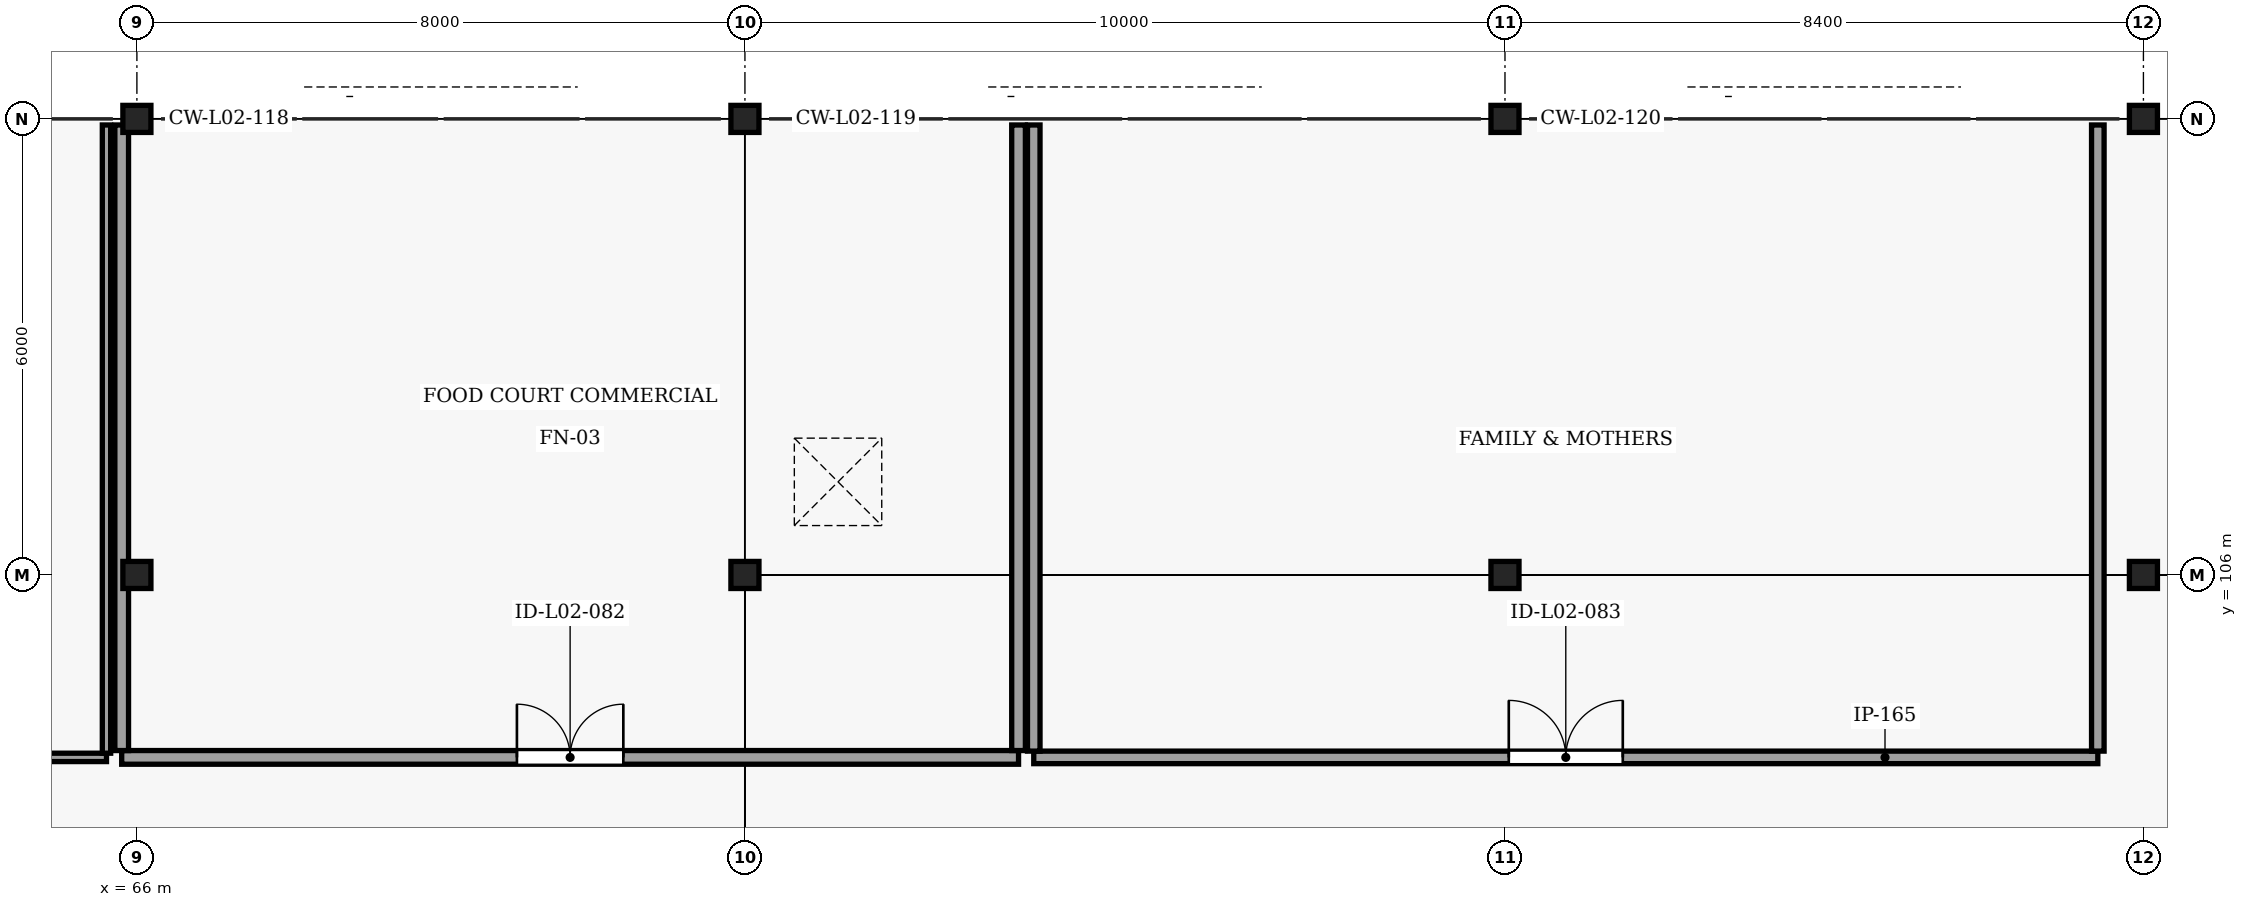
"""IFC4 building model, lengths in metres.
Left out: names, types, materials, properties, quantities, classifications, styles, units other than length and angle.
Written with IfcOpenShell. Run it as: python <this file> out.ifc"""

import sys

from ifc_helpers import new_model, si_unit, direction, frame, frame_2d, origin, origin_2d, place, context, subcontext, project, spatial, rectangle, i_section, extrude, element, fill, save


model = new_model("IFC4")
c1 = context("Model", 3, precision=1e-05, world=origin(), true_north=direction((0.0, 1.0)))
c2 = subcontext(c1, "Body", "Model", "MODEL_VIEW")
j1 = project(units=[si_unit("LENGTHUNIT", "METRE"), si_unit("PLANEANGLEUNIT", "RADIAN")], contexts=[c1])
p1 = place(None, origin())
s1 = spatial("IfcSite", under=j1, at=p1, CompositionType="ELEMENT")
p2 = place(p1, origin())
s2 = spatial("IfcBuilding", under=s1, at=p2, CompositionType="ELEMENT")
p3 = place(p2, frame((0.0, 0.0, 5.4)))
s3 = spatial("IfcBuildingStorey", under=s2, at=p3, CompositionType="ELEMENT", Elevation=5.4)
p4 = place(p3, frame((66.0, 106.0, 0.0), z_axis=(0.0, 0.0, 1.0), x_axis=(1.0, 0.0, 0.0)))
e1 = element("IfcColumn", 1, at=p4, inside=s3, PredefinedType="COLUMN", context=c2, shape_type="SweptSolid", body=[
    extrude(i_section(OverallWidth=0.369, OverallDepth=0.356, WebThickness=0.011, FlangeThickness=0.018, FilletRadius=0.015, at=origin_2d()), origin(), (0.0, 0.0, 1.0), 4.45),
])
for number, where, z_axis, x_axis in (
    (2, (74.0, 106.0, 0.0), (0.0, 0.0, 1.0), (1.0, 0.0, 0.0)),
    (3, (84.0, 106.0, 0.0), (0.0, 0.0, 1.0), (1.0, 0.0, 0.0)),
    (4, (92.4, 106.0, 0.0), (0.0, 0.0, 1.0), (1.0, 0.0, 0.0)),
):
    element("IfcColumn", number, at=place(p3, frame(where, z_axis=z_axis, x_axis=x_axis)), inside=s3, PredefinedType="COLUMN", context=c2, shape_type="SweptSolid", body=[
        extrude(i_section(OverallWidth=0.369, OverallDepth=0.356, WebThickness=0.011, FlangeThickness=0.018, FilletRadius=0.015, at=origin_2d()), origin(), (0.0, 0.0, 1.0), 4.5),
    ])
p5 = place(p3, frame((66.0, 112.0, 0.0), z_axis=(0.0, 0.0, 1.0), x_axis=(1.0, 0.0, 0.0)))
e5 = element("IfcColumn", 5, at=p5, inside=s3, PredefinedType="COLUMN", context=c2, shape_type="SweptSolid", body=[
    extrude(i_section(OverallWidth=0.369, OverallDepth=0.356, WebThickness=0.011, FlangeThickness=0.018, FilletRadius=0.015, at=origin_2d()), origin(), (0.0, 0.0, 1.0), 4.45),
])
for number, where, z_axis, x_axis in (
    (6, (74.0, 112.0, 0.0), (0.0, 0.0, 1.0), (1.0, 0.0, 0.0)),
    (7, (84.0, 112.0, 0.0), (0.0, 0.0, 1.0), (1.0, 0.0, 0.0)),
    (8, (92.4, 112.0, 0.0), (0.0, 0.0, 1.0), (1.0, 0.0, 0.0)),
):
    element("IfcColumn", number, at=place(p3, frame(where, z_axis=z_axis, x_axis=x_axis)), inside=s3, PredefinedType="COLUMN", context=c2, shape_type="SweptSolid", body=[
        extrude(i_section(OverallWidth=0.369, OverallDepth=0.356, WebThickness=0.011, FlangeThickness=0.018, FilletRadius=0.015, at=origin_2d()), origin(), (0.0, 0.0, 1.0), 4.5),
    ])
p6 = place(p3, frame((55.6, 103.6, 0.0), z_axis=(0.0, 0.0, 1.0), x_axis=(1.0, 0.0, 0.0)))
e9 = element("IfcWall", 9, at=p6, inside=s3, PredefinedType="MOVABLE", context=c2, shape_type="SweptSolid", body=[
    extrude(rectangle(XDim=10.0, YDim=0.11, at=frame_2d((5.0, 0.0))), origin(), (0.0, 0.0, 1.0), 4.033),
])
p7 = place(p6, frame((4.1, 0.0, 0.0)))
e10 = element("IfcOpeningElement", 10, at=p7, cuts=e9, PredefinedType="OPENING", context=c2, shape_type="SweptSolid", body=[
    extrude(rectangle(XDim=1.8, YDim=2.3, at=frame_2d((0.9, 1.15))), frame((0.0, 0.065, 0.0), z_axis=(0.0, -1.0, 0.0), x_axis=(1.0, 0.0, 0.0)), (0.0, 0.0, 1.0), 0.13),
])
p8 = place(p3, frame((65.6, 103.655, 0.0), z_axis=(0.0, 0.0, 1.0), x_axis=(0.0, 1.0, 0.0)))
e11 = element("IfcWall", 11, at=p8, inside=s3, PredefinedType="MOVABLE", context=c2, shape_type="SweptSolid", body=[
    extrude(rectangle(XDim=8.265, YDim=0.11, at=frame_2d((4.132, 0.0))), origin(), (0.0, 0.0, 1.0), 3.99),
])
p9 = place(p3, frame((65.8, 103.6, 0.0), z_axis=(0.0, 0.0, 1.0), x_axis=(1.0, 0.0, 0.0)))
e12 = element("IfcWall", 12, at=p9, inside=s3, PredefinedType="SOLIDWALL", context=c2, shape_type="SweptSolid", body=[
    extrude(rectangle(XDim=11.8, YDim=0.18, at=frame_2d((5.9, 0.0))), origin(), (0.0, 0.0, 1.0), 4.033),
])
p10 = place(p9, frame((5.2, 0.0, 0.0)))
e13 = element("IfcOpeningElement", 13, at=p10, cuts=e12, PredefinedType="OPENING", context=c2, shape_type="SweptSolid", body=[
    extrude(rectangle(XDim=1.4, YDim=2.2, at=frame_2d((0.7, 1.1))), frame((0.0, 0.1, 0.0), z_axis=(0.0, -1.0, 0.0), x_axis=(1.0, 0.0, 0.0)), (0.0, 0.0, 1.0), 0.2),
])
p11 = place(p3, frame((65.8, 103.69, 0.0), z_axis=(0.0, 0.0, 1.0), x_axis=(0.0, 1.0, 0.0)))
e14 = element("IfcWall", 14, at=p11, inside=s3, PredefinedType="SOLIDWALL", context=c2, shape_type="SweptSolid", body=[
    extrude(rectangle(XDim=8.23, YDim=0.18, at=frame_2d((4.115, 0.0))), origin(), (0.0, 0.0, 1.0), 3.99),
])
p12 = place(p3, frame((77.6, 103.69, 0.0), z_axis=(0.0, 0.0, 1.0), x_axis=(0.0, 1.0, 0.0)))
e15 = element("IfcWall", 15, at=p12, inside=s3, PredefinedType="SOLIDWALL", context=c2, shape_type="SweptSolid", body=[
    extrude(rectangle(XDim=8.23, YDim=0.18, at=frame_2d((4.115, 0.0))), origin(), (0.0, 0.0, 1.0), 4.04),
])
p13 = place(p3, frame((77.8, 103.6, 0.0), z_axis=(0.0, 0.0, 1.0), x_axis=(1.0, 0.0, 0.0)))
e16 = element("IfcWall", 16, at=p13, inside=s3, PredefinedType="PARTITIONING", context=c2, shape_type="SweptSolid", body=[
    extrude(rectangle(XDim=14.0, YDim=0.165, at=frame_2d((7.0, 0.0))), origin(), (0.0, 0.0, 1.0), 4.083),
])
p14 = place(p13, frame((6.25, 0.0, 0.0)))
e17 = element("IfcOpeningElement", 17, at=p14, cuts=e16, PredefinedType="OPENING", context=c2, shape_type="SweptSolid", body=[
    extrude(rectangle(XDim=1.5, YDim=2.3, at=frame_2d((0.75, 1.15))), frame((0.0, 0.093, 0.0), z_axis=(0.0, -1.0, 0.0), x_axis=(1.0, 0.0, 0.0)), (0.0, 0.0, 1.0), 0.185),
])
for number, where, z_axis, x_axis in (
    (18, (77.8, 103.683, 0.0), (0.0, 0.0, 1.0), (0.0, 1.0, 0.0)),
    (19, (91.8, 103.683, 0.0), (0.0, 0.0, 1.0), (0.0, 1.0, 0.0)),
):
    element("IfcWall", number, at=place(p3, frame(where, z_axis=z_axis, x_axis=x_axis)), inside=s3, PredefinedType="PARTITIONING", context=c2, shape_type="SweptSolid", body=[
        extrude(rectangle(XDim=8.237, YDim=0.165, at=frame_2d((4.119, 0.0))), origin(), (0.0, 0.0, 1.0), 4.04),
    ])
p15 = place(p10, origin())
e20 = element("IfcDoor", 20, at=p15, inside=s3, OperationType="DOUBLE_DOOR_DOUBLE_SWING", PredefinedType="DOOR", context=c2, shape_type="SweptSolid", body=[
    extrude(rectangle(XDim=1.4, YDim=2.2, at=frame_2d((0.7, 1.1))), frame((0.0, 0.025, 0.0), z_axis=(0.0, -1.0, 0.0), x_axis=(1.0, 0.0, 0.0)), (0.0, 0.0, 1.0), 0.05),
])
fill(e13, e20)
p16 = place(p14, origin())
e21 = element("IfcDoor", 21, at=p16, inside=s3, OperationType="DOUBLE_DOOR_SINGLE_SWING", PredefinedType="DOOR", context=c2, shape_type="SweptSolid", body=[
    extrude(rectangle(XDim=1.5, YDim=2.3, at=frame_2d((0.75, 1.15))), frame((0.0, 0.025, 0.0), z_axis=(0.0, -1.0, 0.0), x_axis=(1.0, 0.0, 0.0)), (0.0, 0.0, 1.0), 0.05),
])
fill(e17, e21)
save(model, sys.argv[1])
